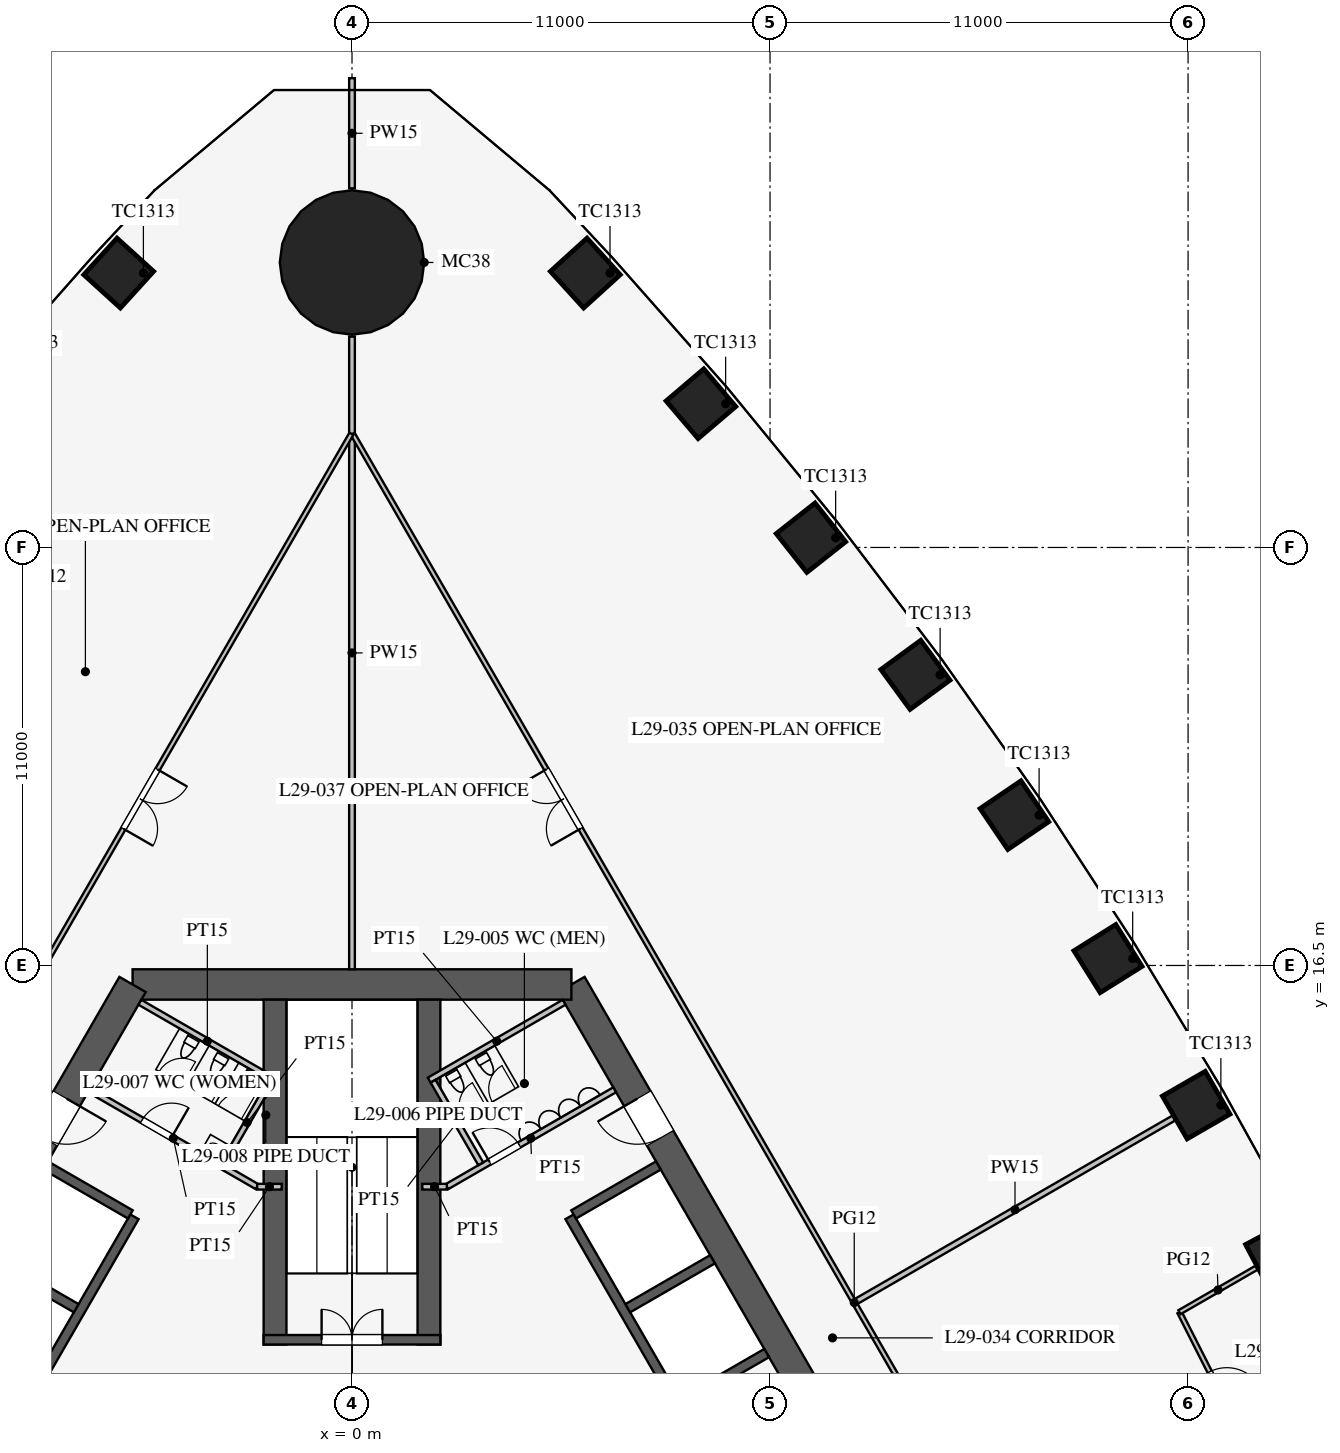
"""IFC4 building model, lengths in metres.
Left out: names, types, materials, properties, quantities, classifications, styles, units other than length and angle.
Written with IfcOpenShell. Run it as: python <this file> out.ifc"""

import sys

from ifc_helpers import new_model, si_unit, direction, frame, frame_2d, origin, origin_2d, place, context, subcontext, project, spatial, rectangle, circle, extrude, element, fill, save


model = new_model("IFC4")
c1 = context("Model", 3, precision=1e-05, world=origin(), true_north=direction((0.0, 1.0)))
c2 = subcontext(c1, "Body", "Model", "MODEL_VIEW")
j1 = project(units=[si_unit("LENGTHUNIT", "METRE"), si_unit("PLANEANGLEUNIT", "RADIAN")], contexts=[c1])
p1 = place(None, origin())
s1 = spatial("IfcSite", under=j1, at=p1, CompositionType="ELEMENT")
p2 = place(p1, origin())
s2 = spatial("IfcBuilding", under=s1, at=p2, CompositionType="ELEMENT")
p3 = place(p2, frame((0.0, 0.0, 128.3)))
s3 = spatial("IfcBuildingStorey", under=s2, at=p3, CompositionType="ELEMENT", Elevation=128.3)
for number, where, z_axis, x_axis in (
    (1, (24.393, 8.887, 0.0), (0.0, 0.0, 1.0), (-0.468, 0.883, 0.0)),
    (2, (22.213, 12.825, 0.0), (0.0, 0.0, 1.0), (-0.5, 0.866, 0.0)),
    (3, (19.893, 16.681, 0.0), (0.0, 0.0, 1.0), (-0.531, 0.847, 0.0)),
    (4, (17.43, 20.456, 0.0), (0.0, 0.0, 1.0), (-0.561, 0.828, 0.0)),
    (5, (14.825, 24.148, 0.0), (0.0, 0.0, 1.0), (-0.591, 0.807, 0.0)),
    (6, (12.077, 27.757, 0.0), (0.0, 0.0, 1.0), (-0.62, 0.785, 0.0)),
    (7, (9.182, 31.282, 0.0), (0.0, 0.0, 1.0), (-0.648, 0.762, 0.0)),
    (8, (6.139, 34.721, 0.0), (0.0, 0.0, 1.0), (-0.672, 0.74, 0.0)),
    (9, (-6.139, 34.721, 0.0), (0.0, 0.0, 1.0), (-0.672, -0.74, 0.0)),
):
    element("IfcColumn", number, at=place(p3, frame(where, z_axis=z_axis, x_axis=x_axis)), inside=s3, PredefinedType="COLUMN", context=c2, shape_type="SweptSolid", body=[
        extrude(rectangle(XDim=1.3, YDim=1.3, at=origin_2d()), origin(), (0.0, 0.0, 1.0), 4.2),
    ])
p4 = place(p3, frame((0.0, 35.0, 0.0), z_axis=(0.0, 0.0, 1.0), x_axis=(1.0, 0.0, 0.0)))
e10 = element("IfcColumn", 10, at=p4, inside=s3, PredefinedType="COLUMN", context=c2, shape_type="SweptSolid", body=[
    extrude(circle(Radius=1.9, at=origin_2d()), origin(), (0.0, 0.0, 1.0), 4.2),
])
p5 = place(p3, frame((16.743, -3.0, 0.0), z_axis=(0.0, 0.0, 1.0), x_axis=(-0.500002442456, 0.866023993627, 0.0)))
e11 = element("IfcWall", 11, at=p5, inside=s3, PredefinedType="SHEAR", context=c2, shape_type="SweptSolid", body=[
    extrude(rectangle(XDim=21.939, YDim=0.8, at=frame_2d((10.97, 0.0))), origin(), (0.0, 0.0, 1.0), 4.2),
])
p6 = place(p5, frame((17.27, 0.0, 0.0)))
e12 = element("IfcOpeningElement", 12, at=p6, cuts=e11, PredefinedType="OPENING", context=c2, shape_type="SweptSolid", body=[
    extrude(rectangle(XDim=1.2, YDim=2.1, at=frame_2d((0.6, 1.05))), frame((0.0, 0.41, 0.0), z_axis=(0.0, -1.0, 0.0), x_axis=(1.0, 0.0, 0.0)), (0.0, 0.0, 1.0), 0.82),
])
p7 = place(p5, frame((3.47, 0.0, 0.0)))
e13 = element("IfcOpeningElement", 13, at=p7, cuts=e11, PredefinedType="OPENING", context=c2, shape_type="SweptSolid", body=[
    extrude(rectangle(XDim=1.2, YDim=2.1, at=frame_2d((0.6, 1.05))), frame((0.0, 0.41, 0.0), z_axis=(0.0, -1.0, 0.0), x_axis=(1.0, 0.0, 0.0)), (0.0, 0.0, 1.0), 0.82),
])
p8 = place(p3, frame((5.773, 16.0, 0.0), z_axis=(0.0, 0.0, 1.0), x_axis=(-1.0, 0.0, 0.0)))
e14 = element("IfcWall", 14, at=p8, inside=s3, PredefinedType="SHEAR", context=c2, shape_type="SweptSolid", body=[
    extrude(rectangle(XDim=11.547, YDim=0.8, at=frame_2d((5.773, 0.0))), origin(), (0.0, 0.0, 1.0), 4.2),
])
p9 = place(p3, frame((-5.773, 16.0, 0.0), z_axis=(0.0, 0.0, 1.0), x_axis=(-0.500002442456, -0.866023993627, 0.0)))
e15 = element("IfcWall", 15, at=p9, inside=s3, PredefinedType="SHEAR", context=c2, shape_type="SweptSolid", body=[
    extrude(rectangle(XDim=21.939, YDim=0.8, at=frame_2d((10.97, 0.0))), origin(), (0.0, 0.0, 1.0), 4.2),
])
p10 = place(p9, frame((17.27, 0.0, 0.0)))
e16 = element("IfcOpeningElement", 16, at=p10, cuts=e15, PredefinedType="OPENING", context=c2, shape_type="SweptSolid", body=[
    extrude(rectangle(XDim=1.2, YDim=2.1, at=frame_2d((0.6, 1.05))), frame((0.0, 0.41, 0.0), z_axis=(0.0, -1.0, 0.0), x_axis=(1.0, 0.0, 0.0)), (0.0, 0.0, 1.0), 0.82),
])
p11 = place(p9, frame((3.47, 0.0, 0.0)))
e17 = element("IfcOpeningElement", 17, at=p11, cuts=e15, PredefinedType="OPENING", context=c2, shape_type="SweptSolid", body=[
    extrude(rectangle(XDim=1.2, YDim=2.1, at=frame_2d((0.6, 1.05))), frame((0.0, 0.41, 0.0), z_axis=(0.0, -1.0, 0.0), x_axis=(1.0, 0.0, 0.0)), (0.0, 0.0, 1.0), 0.82),
])
p12 = place(p3, frame((11.424, 0.014, 0.0), z_axis=(0.0, 0.0, 1.0), x_axis=(-0.500001763848, 0.866024385424, 0.0)))
e18 = element("IfcWall", 18, at=p12, inside=s3, PredefinedType="SHEAR", context=c2, shape_type="SweptSolid", body=[
    extrude(rectangle(XDim=11.4, YDim=0.25, at=frame_2d((5.7, 0.0))), origin(), (0.0, 0.0, 1.0), 4.2),
])
p13 = place(p12, frame((0.975, 0.0, 0.0)))
e19 = element("IfcOpeningElement", 19, at=p13, cuts=e18, PredefinedType="OPENING", context=c2, shape_type="SweptSolid", body=[
    extrude(rectangle(XDim=0.9, YDim=2.1, at=frame_2d((0.45, 1.05))), frame((0.0, 0.135, 0.0), z_axis=(0.0, -1.0, 0.0), x_axis=(1.0, 0.0, 0.0)), (0.0, 0.0, 1.0), 0.27),
])
p14 = place(p12, frame((3.825, 0.0, 0.0)))
e20 = element("IfcOpeningElement", 20, at=p14, cuts=e18, PredefinedType="OPENING", context=c2, shape_type="SweptSolid", body=[
    extrude(rectangle(XDim=0.9, YDim=2.1, at=frame_2d((0.45, 1.05))), frame((0.0, 0.135, 0.0), z_axis=(0.0, -1.0, 0.0), x_axis=(1.0, 0.0, 0.0)), (0.0, 0.0, 1.0), 0.27),
])
for number, where, z_axis, x_axis in (
    (21, (8.682, 5.012, 0.0), (0.0, 0.0, 1.0), (0.866, 0.5, 0.0)),
    (22, (7.257, 7.481, 0.0), (0.0, 0.0, 1.0), (0.866, 0.5, 0.0)),
):
    element("IfcWall", number, at=place(p3, frame(where, z_axis=z_axis, x_axis=x_axis)), inside=s3, PredefinedType="SHEAR", context=c2, shape_type="SweptSolid", body=[
        extrude(rectangle(XDim=2.575, YDim=0.25, at=frame_2d((1.288, 0.0))), origin(), (0.0, 0.0, 1.0), 4.2),
    ])
p15 = place(p3, frame((5.832, 9.949, 0.0), z_axis=(0.0, 0.0, 1.0), x_axis=(0.866029291668, 0.499993265928, 0.0)))
e23 = element("IfcWall", 23, at=p15, inside=s3, PredefinedType="SHEAR", context=c2, shape_type="SweptSolid", body=[
    extrude(rectangle(XDim=2.575, YDim=0.25, at=frame_2d((1.288, 0.0))), origin(), (0.0, 0.0, 1.0), 4.2),
])
p16 = place(p3, frame((-5.724, 9.886, 0.0), z_axis=(0.0, 0.0, 1.0), x_axis=(-0.500001763848, -0.866024385424, 0.0)))
e24 = element("IfcWall", 24, at=p16, inside=s3, PredefinedType="SHEAR", context=c2, shape_type="SweptSolid", body=[
    extrude(rectangle(XDim=11.4, YDim=0.25, at=frame_2d((5.7, 0.0))), origin(), (0.0, 0.0, 1.0), 4.2),
])
p17 = place(p16, frame((6.525, 0.0, 0.0)))
e25 = element("IfcOpeningElement", 25, at=p17, cuts=e24, PredefinedType="OPENING", context=c2, shape_type="SweptSolid", body=[
    extrude(rectangle(XDim=1.2, YDim=2.2, at=frame_2d((0.6, 1.1))), frame((0.0, 0.135, 0.0), z_axis=(0.0, -1.0, 0.0), x_axis=(1.0, 0.0, 0.0)), (0.0, 0.0, 1.0), 0.27),
])
p18 = place(p16, frame((9.375, 0.0, 0.0)))
e26 = element("IfcOpeningElement", 26, at=p18, cuts=e24, PredefinedType="OPENING", context=c2, shape_type="SweptSolid", body=[
    extrude(rectangle(XDim=1.2, YDim=2.2, at=frame_2d((0.6, 1.1))), frame((0.0, 0.135, 0.0), z_axis=(0.0, -1.0, 0.0), x_axis=(1.0, 0.0, 0.0)), (0.0, 0.0, 1.0), 0.27),
])
p19 = place(p3, frame((-5.832, 9.949, 0.0), z_axis=(0.0, 0.0, 1.0), x_axis=(-0.866029291668, 0.499993265928, 0.0)))
e27 = element("IfcWall", 27, at=p19, inside=s3, PredefinedType="SHEAR", context=c2, shape_type="SweptSolid", body=[
    extrude(rectangle(XDim=2.575, YDim=0.25, at=frame_2d((1.288, 0.0))), origin(), (0.0, 0.0, 1.0), 4.2),
])
p20 = place(p3, frame((-7.257, 7.481, 0.0), z_axis=(0.0, 0.0, 1.0), x_axis=(-0.866046643894, 0.499963209246, 0.0)))
e28 = element("IfcWall", 28, at=p20, inside=s3, PredefinedType="SHEAR", context=c2, shape_type="SweptSolid", body=[
    extrude(rectangle(XDim=2.575, YDim=0.25, at=frame_2d((1.288, 0.0))), origin(), (0.0, 0.0, 1.0), 4.2),
])
for number, where, z_axis, x_axis in (
    (29, (2.025, 6.525, 0.0), (0.0, 0.0, 1.0), (0.0, 1.0, 0.0)),
    (30, (-2.025, 6.525, 0.0), (0.0, 0.0, 1.0), (0.0, 1.0, 0.0)),
):
    element("IfcWall", number, at=place(p3, frame(where, z_axis=z_axis, x_axis=x_axis)), inside=s3, PredefinedType="SHEAR", context=c2, shape_type="SweptSolid", body=[
        extrude(rectangle(XDim=9.075, YDim=0.6, at=frame_2d((4.538, 0.0))), origin(), (0.0, 0.0, 1.0), 4.2),
    ])
p21 = place(p3, frame((2.325, 6.65, 0.0), z_axis=(0.0, 0.0, 1.0), x_axis=(-1.0, 0.0, 0.0)))
e31 = element("IfcWall", 31, at=p21, inside=s3, PredefinedType="SHEAR", context=c2, shape_type="SweptSolid", body=[
    extrude(rectangle(XDim=4.65, YDim=0.25, at=frame_2d((2.325, 0.0))), origin(), (0.0, 0.0, 1.0), 4.2),
])
p22 = place(p21, frame((1.525, 0.0, 0.0)))
e32 = element("IfcOpeningElement", 32, at=p22, cuts=e31, PredefinedType="OPENING", context=c2, shape_type="SweptSolid", body=[
    extrude(rectangle(XDim=1.6, YDim=2.1, at=frame_2d((0.8, 1.05))), frame((0.0, 0.135, 0.0), z_axis=(0.0, -1.0, 0.0), x_axis=(1.0, 0.0, 0.0)), (0.0, 0.0, 1.0), 0.27),
])
p23 = place(p3, frame((2.495, 10.678, 0.0), z_axis=(0.0, 0.0, 1.0), x_axis=(0.86602216432, 0.500005610874, 0.0)))
e33 = element("IfcWall", 33, at=p23, inside=s3, PredefinedType="PARTITIONING", context=c2, shape_type="SweptSolid", body=[
    extrude(rectangle(XDim=5.1, YDim=0.15, at=frame_2d((2.55, 0.0))), origin(), (0.0, 0.0, 1.0), 4.0),
])
p24 = place(p23, frame((1.3, 0.0, 0.0)))
e34 = element("IfcOpeningElement", 34, at=p24, cuts=e33, PredefinedType="OPENING", context=c2, shape_type="SweptSolid", body=[
    extrude(rectangle(XDim=0.9, YDim=2.1, at=frame_2d((0.45, 1.05))), frame((0.0, 0.085, 0.0), z_axis=(0.0, -1.0, 0.0), x_axis=(1.0, 0.0, 0.0)), (0.0, 0.0, 1.0), 0.17),
])
p25 = place(p3, frame((-2.495, 10.678, 0.0), z_axis=(0.0, 0.0, 1.0), x_axis=(-0.86602216432, 0.500005610874, 0.0)))
e35 = element("IfcWall", 35, at=p25, inside=s3, PredefinedType="PARTITIONING", context=c2, shape_type="SweptSolid", body=[
    extrude(rectangle(XDim=5.1, YDim=0.15, at=frame_2d((2.55, 0.0))), origin(), (0.0, 0.0, 1.0), 4.0),
])
p26 = place(p25, frame((2.6, 0.0, 0.0)))
e36 = element("IfcOpeningElement", 36, at=p26, cuts=e35, PredefinedType="OPENING", context=c2, shape_type="SweptSolid", body=[
    extrude(rectangle(XDim=0.9, YDim=2.1, at=frame_2d((0.45, 1.05))), frame((0.0, 0.085, 0.0), z_axis=(0.0, -1.0, 0.0), x_axis=(1.0, 0.0, 0.0)), (0.0, 0.0, 1.0), 0.17),
])
for number, where, z_axis, x_axis in (
    (37, (2.495, 10.678, 0.0), (0.0, 0.0, 1.0), (-1.0, 0.0, 0.0)),
    (38, (-2.495, 10.678, 0.0), (0.0, 0.0, 1.0), (1.0, 0.0, 0.0)),
):
    element("IfcWall", number, at=place(p3, frame(where, z_axis=z_axis, x_axis=x_axis)), inside=s3, PredefinedType="PARTITIONING", context=c2, shape_type="SweptSolid", body=[
        extrude(rectangle(XDim=0.645, YDim=0.15, at=frame_2d((0.323, 0.0))), origin(), (0.0, 0.0, 1.0), 4.0),
    ])
p27 = place(p3, frame((2.031, 13.482, 0.0), z_axis=(0.0, 0.0, 1.0), x_axis=(0.866050731258, 0.499956128963, 0.0)))
e39 = element("IfcWall", 39, at=p27, inside=s3, PredefinedType="PARTITIONING", context=c2, shape_type="SweptSolid", body=[
    extrude(rectangle(XDim=4.1, YDim=0.15, at=frame_2d((2.05, 0.0))), origin(), (0.0, 0.0, 1.0), 4.0),
])
p28 = place(p3, frame((3.389, 11.281, 0.0), z_axis=(0.0, 0.0, 1.0), x_axis=(-0.499989096993, 0.866031698547, 0.0)))
e40 = element("IfcWall", 40, at=p28, inside=s3, PredefinedType="PARTITIONING", context=c2, shape_type="SweptSolid", body=[
    extrude(rectangle(XDim=2.51, YDim=0.15, at=frame_2d((1.255, 0.0))), origin(), (0.0, 0.0, 1.0), 4.0),
])
p29 = place(p3, frame((-2.031, 13.482, 0.0), z_axis=(0.0, 0.0, 1.0), x_axis=(-0.866050731258, 0.499956128963, 0.0)))
e41 = element("IfcWall", 41, at=p29, inside=s3, PredefinedType="PARTITIONING", context=c2, shape_type="SweptSolid", body=[
    extrude(rectangle(XDim=4.1, YDim=0.15, at=frame_2d((2.05, 0.0))), origin(), (0.0, 0.0, 1.0), 4.0),
])
p30 = place(p3, frame((-3.389, 11.281, 0.0), z_axis=(0.0, 0.0, 1.0), x_axis=(0.499989096993, 0.866031698547, 0.0)))
e42 = element("IfcWall", 42, at=p30, inside=s3, PredefinedType="PARTITIONING", context=c2, shape_type="SweptSolid", body=[
    extrude(rectangle(XDim=2.51, YDim=0.15, at=frame_2d((1.255, 0.0))), origin(), (0.0, 0.0, 1.0), 4.0),
])
p31 = place(p3, frame((0.0, 16.4, 0.0), z_axis=(0.0, 0.0, 1.0), x_axis=(0.0, 1.0, 0.0)))
e43 = element("IfcWall", 43, at=p31, inside=s3, PredefinedType="PARTITIONING", context=c2, shape_type="SweptSolid", body=[
    extrude(rectangle(XDim=16.65, YDim=0.15, at=frame_2d((8.325, 0.0))), origin(), (0.0, 0.0, 1.0), 2.3),
])
p32 = place(p3, frame((0.0, 36.95, 0.0), z_axis=(0.0, 0.0, 1.0), x_axis=(0.0, 1.0, 0.0)))
e44 = element("IfcWall", 44, at=p32, inside=s3, PredefinedType="PARTITIONING", context=c2, shape_type="SweptSolid", body=[
    extrude(rectangle(XDim=2.899, YDim=0.15, at=frame_2d((1.45, 0.0))), origin(), (0.0, 0.0, 1.0), 2.3),
])
p33 = place(p3, frame((13.268, 7.66, 0.0), z_axis=(0.0, 0.0, 1.0), x_axis=(0.866015788683, 0.500016653474, 0.0)))
e45 = element("IfcWall", 45, at=p33, inside=s3, PredefinedType="PARTITIONING", context=c2, shape_type="SweptSolid", body=[
    extrude(rectangle(XDim=9.65, YDim=0.15, at=frame_2d((4.825, 0.0))), origin(), (0.0, 0.0, 1.0), 3.2),
])
p34 = place(p3, frame((26.415, -15.231, 0.0), z_axis=(0.0, 0.0, 1.0), x_axis=(-0.50000091641, 0.866024874695, 0.0)))
e46 = element("IfcWall", 46, at=p34, inside=s3, PredefinedType="PARTITIONING", context=c2, shape_type="SweptSolid", body=[
    extrude(rectangle(XDim=52.796, YDim=0.12, at=frame_2d((26.398, 0.0))), origin(), (0.0, 0.0, 1.0), 2.9),
])
p35 = place(p34, frame((10.2, 0.0, 0.15)))
e47 = element("IfcOpeningElement", 47, at=p35, cuts=e46, PredefinedType="OPENING", context=c2, shape_type="SweptSolid", body=[
    extrude(rectangle(XDim=1.8, YDim=2.1, at=frame_2d((0.9, 1.05))), frame((0.0, 0.07, 0.0), z_axis=(0.0, -1.0, 0.0), x_axis=(1.0, 0.0, 0.0)), (0.0, 0.0, 1.0), 0.14),
])
p36 = place(p34, frame((40.8, 0.0, 0.15)))
e48 = element("IfcOpeningElement", 48, at=p36, cuts=e46, PredefinedType="OPENING", context=c2, shape_type="SweptSolid", body=[
    extrude(rectangle(XDim=1.8, YDim=2.1, at=frame_2d((0.9, 1.05))), frame((0.0, 0.07, 0.0), z_axis=(0.0, -1.0, 0.0), x_axis=(1.0, 0.0, 0.0)), (0.0, 0.0, 1.0), 0.14),
])
p37 = place(p3, frame((23.812, 3.356, 0.0), z_axis=(0.0, 0.0, 1.0), x_axis=(-0.452449820092, 0.891789863308, 0.0)))
e49 = element("IfcWall", 49, at=p37, inside=s3, PredefinedType="PARTITIONING", context=c2, shape_type="SweptSolid", body=[
    extrude(rectangle(XDim=4.507, YDim=0.12, at=frame_2d((2.253, 0.0))), origin(), (0.0, 0.0, 1.0), 2.9),
])
p38 = place(p37, frame((1.75, 0.0, 0.15)))
e50 = element("IfcOpeningElement", 50, at=p38, cuts=e49, PredefinedType="OPENING", context=c2, shape_type="SweptSolid", body=[
    extrude(rectangle(XDim=1.0, YDim=2.1, at=frame_2d((0.5, 1.05))), frame((0.0, 0.07, 0.0), z_axis=(0.0, -1.0, 0.0), x_axis=(1.0, 0.0, 0.0)), (0.0, 0.0, 1.0), 0.14),
])
p39 = place(p3, frame((21.773, 7.375, 0.0), z_axis=(0.0, 0.0, 1.0), x_axis=(0.866055506462, 0.499947857008, 0.0)))
e51 = element("IfcWall", 51, at=p39, inside=s3, PredefinedType="PARTITIONING", context=c2, shape_type="SweptSolid", body=[
    extrude(rectangle(XDim=2.344, YDim=0.12, at=frame_2d((1.172, 0.0))), origin(), (0.0, 0.0, 1.0), 2.9),
])
p40 = place(p3, frame((-0.016, 30.491, 0.0), z_axis=(0.0, 0.0, 1.0), x_axis=(-0.50000091641, -0.866024874695, 0.0)))
e52 = element("IfcWall", 52, at=p40, inside=s3, PredefinedType="PARTITIONING", context=c2, shape_type="SweptSolid", body=[
    extrude(rectangle(XDim=52.796, YDim=0.12, at=frame_2d((26.398, 0.0))), origin(), (0.0, 0.0, 1.0), 2.9),
])
p41 = place(p40, frame((10.2, 0.0, 0.15)))
e53 = element("IfcOpeningElement", 53, at=p41, cuts=e52, PredefinedType="OPENING", context=c2, shape_type="SweptSolid", body=[
    extrude(rectangle(XDim=1.8, YDim=2.1, at=frame_2d((0.9, 1.05))), frame((0.0, 0.07, 0.0), z_axis=(0.0, -1.0, 0.0), x_axis=(1.0, 0.0, 0.0)), (0.0, 0.0, 1.0), 0.14),
])
p42 = place(p40, frame((40.8, 0.0, 0.15)))
e54 = element("IfcOpeningElement", 54, at=p42, cuts=e52, PredefinedType="OPENING", context=c2, shape_type="SweptSolid", body=[
    extrude(rectangle(XDim=1.8, YDim=2.1, at=frame_2d((0.9, 1.05))), frame((0.0, 0.07, 0.0), z_axis=(0.0, -1.0, 0.0), x_axis=(1.0, 0.0, 0.0)), (0.0, 0.0, 1.0), 0.14),
])
p43 = place(p24, origin())
e55 = element("IfcDoor", 55, at=p43, inside=s3, OperationType="SINGLE_SWING_LEFT", PredefinedType="DOOR", context=c2, shape_type="SweptSolid", body=[
    extrude(rectangle(XDim=0.9, YDim=2.1, at=frame_2d((0.45, 1.05))), frame((0.0, 0.025, 0.0), z_axis=(0.0, -1.0, 0.0), x_axis=(1.0, 0.0, 0.0)), (0.0, 0.0, 1.0), 0.05),
])
fill(e34, e55)
p44 = place(p26, frame((0.9, 0.0, 0.0), z_axis=(0.0, 0.0, 1.0), x_axis=(-1.0, 0.0, 0.0)))
e56 = element("IfcDoor", 56, at=p44, inside=s3, OperationType="SINGLE_SWING_RIGHT", PredefinedType="DOOR", context=c2, shape_type="SweptSolid", body=[
    extrude(rectangle(XDim=0.9, YDim=2.1, at=frame_2d((0.45, 1.05))), frame((0.0, 0.025, 0.0), z_axis=(0.0, -1.0, 0.0), x_axis=(1.0, 0.0, 0.0)), (0.0, 0.0, 1.0), 0.05),
])
fill(e36, e56)
p45 = place(p22, frame((1.6, 0.0, 0.0), z_axis=(0.0, 0.0, 1.0), x_axis=(-1.0, 0.0, 0.0)))
e57 = element("IfcDoor", 57, at=p45, inside=s3, OperationType="DOUBLE_DOOR_SINGLE_SWING", PredefinedType="DOOR", context=c2, shape_type="SweptSolid", body=[
    extrude(rectangle(XDim=1.6, YDim=2.1, at=frame_2d((0.8, 1.05))), frame((0.0, 0.025, 0.0), z_axis=(0.0, -1.0, 0.0), x_axis=(1.0, 0.0, 0.0)), (0.0, 0.0, 1.0), 0.05),
])
fill(e32, e57)
p46 = place(p6, origin())
e58 = element("IfcDoor", 58, at=p46, inside=s3, OperationType="SINGLE_SWING_RIGHT", PredefinedType="DOOR", context=c2, shape_type="SweptSolid", body=[
    extrude(rectangle(XDim=1.2, YDim=2.1, at=frame_2d((0.6, 1.05))), frame((0.0, 0.025, 0.0), z_axis=(0.0, -1.0, 0.0), x_axis=(1.0, 0.0, 0.0)), (0.0, 0.0, 1.0), 0.05),
])
fill(e12, e58)
p47 = place(p11, origin())
e59 = element("IfcDoor", 59, at=p47, inside=s3, OperationType="SINGLE_SWING_LEFT", PredefinedType="DOOR", context=c2, shape_type="SweptSolid", body=[
    extrude(rectangle(XDim=1.2, YDim=2.1, at=frame_2d((0.6, 1.05))), frame((0.0, 0.025, 0.0), z_axis=(0.0, -1.0, 0.0), x_axis=(1.0, 0.0, 0.0)), (0.0, 0.0, 1.0), 0.05),
])
fill(e17, e59)
p48 = place(p38, frame((1.0, 0.0, 0.0), z_axis=(0.0, 0.0, 1.0), x_axis=(-1.0, 0.0, 0.0)))
e60 = element("IfcDoor", 60, at=p48, inside=s3, OperationType="SINGLE_SWING_RIGHT", PredefinedType="DOOR", context=c2, shape_type="SweptSolid", body=[
    extrude(rectangle(XDim=1.0, YDim=2.1, at=frame_2d((0.5, 1.05))), frame((0.0, 0.025, 0.0), z_axis=(0.0, -1.0, 0.0), x_axis=(1.0, 0.0, 0.0)), (0.0, 0.0, 1.0), 0.05),
])
fill(e50, e60)
p49 = place(p36, origin())
e61 = element("IfcDoor", 61, at=p49, inside=s3, OperationType="DOUBLE_DOOR_SINGLE_SWING", PredefinedType="DOOR", context=c2, shape_type="SweptSolid", body=[
    extrude(rectangle(XDim=1.8, YDim=2.1, at=frame_2d((0.9, 1.05))), frame((0.0, 0.025, 0.0), z_axis=(0.0, -1.0, 0.0), x_axis=(1.0, 0.0, 0.0)), (0.0, 0.0, 1.0), 0.05),
])
fill(e48, e61)
p50 = place(p41, origin())
e62 = element("IfcDoor", 62, at=p50, inside=s3, OperationType="DOUBLE_DOOR_SINGLE_SWING", PredefinedType="DOOR", context=c2, shape_type="SweptSolid", body=[
    extrude(rectangle(XDim=1.8, YDim=2.1, at=frame_2d((0.9, 1.05))), frame((0.0, 0.025, 0.0), z_axis=(0.0, -1.0, 0.0), x_axis=(1.0, 0.0, 0.0)), (0.0, 0.0, 1.0), 0.05),
])
fill(e53, e62)
save(model, sys.argv[1])
